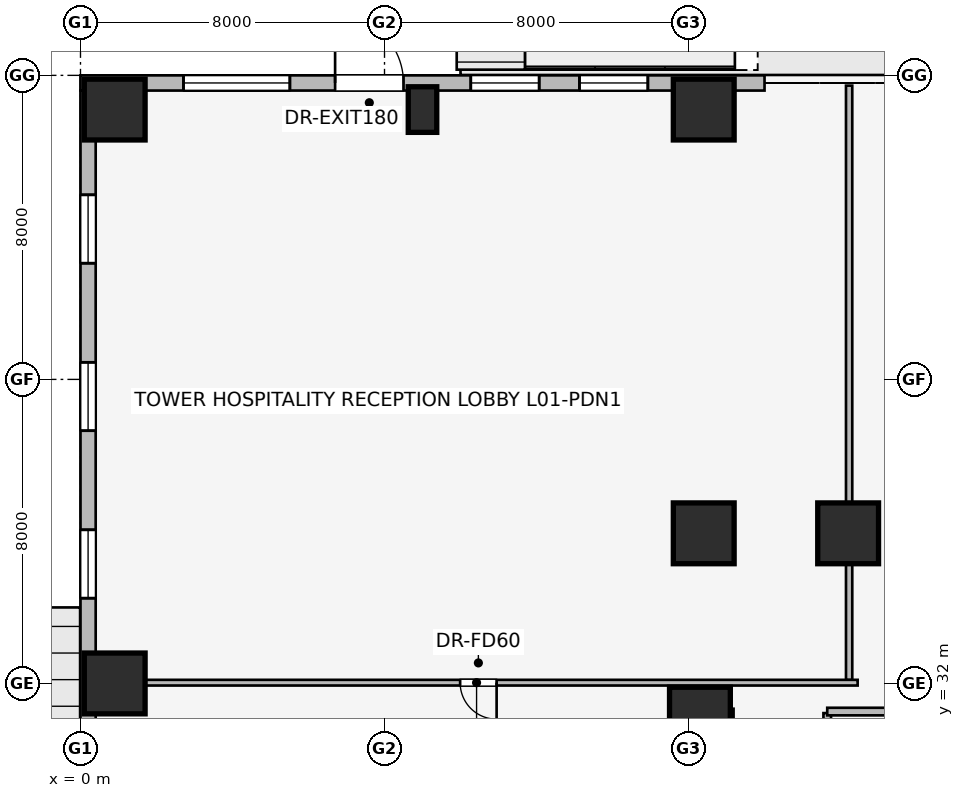
"""IFC4 building model, lengths in metres.
Left out: names, types, materials, properties, quantities, classifications, styles, units other than length and angle.
Written with IfcOpenShell. Run it as: python <this file> out.ifc"""

import sys

from ifc_helpers import new_model, si_unit, direction, frame, frame_2d, origin, origin_2d, place, context, subcontext, project, spatial, rectangle, extrude, element, fill, save


model = new_model("IFC4")
c1 = context("Model", 3, precision=1e-05, world=origin(), true_north=direction((0.0, 1.0)))
c2 = subcontext(c1, "Body", "Model", "MODEL_VIEW")
j1 = project(units=[si_unit("LENGTHUNIT", "METRE"), si_unit("PLANEANGLEUNIT", "RADIAN")], contexts=[c1])
p1 = place(None, origin())
s1 = spatial("IfcSite", under=j1, at=p1, CompositionType="ELEMENT")
p2 = place(p1, origin())
s2 = spatial("IfcBuilding", under=s1, at=p2, CompositionType="ELEMENT")
p3 = place(p2, origin())
s3 = spatial("IfcBuildingStorey", under=s2, at=p3, CompositionType="ELEMENT", Elevation=0.0)
p4 = place(p3, frame((16.85, 25.68, 0.0), z_axis=(0.0, 0.0, 1.0), x_axis=(0.0, 1.0, 0.0)))
e1 = element("IfcWall", 1, at=p4, inside=s3, PredefinedType="SHEAR", context=c2, shape_type="SweptSolid", body=[
    extrude(rectangle(XDim=5.62, YDim=0.6, at=frame_2d((2.81, 0.0))), origin(), (0.0, 0.0, 1.0), 6.0),
])
for number, where, z_axis, x_axis in (
    (2, (16.3, 31.1, 0.0), (0.0, 0.0, 1.0), (1.0, 0.0, 0.0)),
    (3, (0.9, 47.1, 0.0), (0.0, 0.0, 1.0), (1.0, 0.0, 0.0)),
    (4, (16.4, 47.1, 0.0), (0.0, 0.0, 1.0), (1.0, 0.0, 0.0)),
    (5, (0.9, 32.0, 0.0), (0.0, 0.0, 1.0), (1.0, 0.0, 0.0)),
    (6, (20.2, 35.95, 0.0), (0.0, 0.0, 1.0), (1.0, 0.0, 0.0)),
    (7, (16.4, 35.95, 0.0), (0.0, 0.0, 1.0), (1.0, 0.0, 0.0)),
):
    element("IfcColumn", number, at=place(p3, frame(where, z_axis=z_axis, x_axis=x_axis)), inside=s3, PredefinedType="COLUMN", context=c2, shape_type="SweptSolid", body=[
        extrude(rectangle(XDim=1.6, YDim=1.6, at=origin_2d()), origin(), (0.0, 0.0, 1.0), 6.0),
    ])
p5 = place(p3, frame((9.0, 47.1, 0.0), z_axis=(0.0, 0.0, 1.0), x_axis=(1.0, 0.0, 0.0)))
e8 = element("IfcColumn", 8, at=p5, inside=s3, PredefinedType="PILASTER", context=c2, shape_type="SweptSolid", body=[
    extrude(rectangle(XDim=0.75, YDim=1.2, at=origin_2d()), origin(), (0.0, 0.0, 1.0), 6.0),
])
p6 = place(p3, frame((0.0, 47.8, 0.0), z_axis=(0.0, 0.0, 1.0), x_axis=(1.0, 0.0, 0.0)))
e9 = element("IfcWall", 9, at=p6, inside=s3, PredefinedType="STANDARD", context=c2, shape_type="SweptSolid", body=[
    extrude(rectangle(XDim=18.0, YDim=0.4, at=frame_2d((9.0, 0.0))), origin(), (0.0, 0.0, 1.0), 5.69),
])
p7 = place(p6, frame((6.7, 0.0, 0.0)))
e10 = element("IfcOpeningElement", 10, at=p7, cuts=e9, PredefinedType="OPENING", context=c2, shape_type="SweptSolid", body=[
    extrude(rectangle(XDim=1.8, YDim=2.3, at=frame_2d((0.9, 1.15))), frame((0.0, 0.21, 0.0), z_axis=(0.0, -1.0, 0.0), x_axis=(1.0, 0.0, 0.0)), (0.0, 0.0, 1.0), 0.42),
])
p8 = place(p6, frame((2.71, 0.0, 0.75)))
e11 = element("IfcOpeningElement", 11, at=p8, cuts=e9, PredefinedType="OPENING", context=c2, shape_type="SweptSolid", body=[
    extrude(rectangle(XDim=2.8, YDim=1.8, at=frame_2d((1.4, 0.9))), frame((0.0, 0.21, 0.0), z_axis=(0.0, -1.0, 0.0), x_axis=(1.0, 0.0, 0.0)), (0.0, 0.0, 1.0), 0.42),
])
p9 = place(p6, frame((10.27, 0.0, 0.75)))
e12 = element("IfcOpeningElement", 12, at=p9, cuts=e9, PredefinedType="OPENING", context=c2, shape_type="SweptSolid", body=[
    extrude(rectangle(XDim=1.8, YDim=1.5, at=frame_2d((0.9, 0.75))), frame((0.0, 0.21, 0.0), z_axis=(0.0, -1.0, 0.0), x_axis=(1.0, 0.0, 0.0)), (0.0, 0.0, 1.0), 0.42),
])
p10 = place(p6, frame((13.13, 0.0, 0.75)))
e13 = element("IfcOpeningElement", 13, at=p10, cuts=e9, PredefinedType="OPENING", context=c2, shape_type="SweptSolid", body=[
    extrude(rectangle(XDim=1.8, YDim=1.5, at=frame_2d((0.9, 0.75))), frame((0.0, 0.21, 0.0), z_axis=(0.0, -1.0, 0.0), x_axis=(1.0, 0.0, 0.0)), (0.0, 0.0, 1.0), 0.42),
])
p11 = place(p3, frame((0.2, 24.0, 0.0), z_axis=(0.0, 0.0, 1.0), x_axis=(0.0, 1.0, 0.0)))
e14 = element("IfcWall", 14, at=p11, inside=s3, PredefinedType="STANDARD", context=c2, shape_type="SweptSolid", body=[
    extrude(rectangle(XDim=23.6, YDim=0.4, at=frame_2d((11.8, 0.0))), origin(), (0.0, 0.0, 1.0), 5.69),
])
p12 = place(p11, frame((0.778, 0.0, 0.75)))
e15 = element("IfcOpeningElement", 15, at=p12, cuts=e14, PredefinedType="OPENING", context=c2, shape_type="SweptSolid", body=[
    extrude(rectangle(XDim=2.8, YDim=1.8, at=frame_2d((1.4, 0.9))), frame((0.0, 0.21, 0.0), z_axis=(0.0, -1.0, 0.0), x_axis=(1.0, 0.0, 0.0)), (0.0, 0.0, 1.0), 0.42),
])
p13 = place(p11, frame((4.033, 0.0, 0.75)))
e16 = element("IfcOpeningElement", 16, at=p13, cuts=e14, PredefinedType="OPENING", context=c2, shape_type="SweptSolid", body=[
    extrude(rectangle(XDim=2.8, YDim=1.8, at=frame_2d((1.4, 0.9))), frame((0.0, 0.21, 0.0), z_axis=(0.0, -1.0, 0.0), x_axis=(1.0, 0.0, 0.0)), (0.0, 0.0, 1.0), 0.42),
])
p14 = place(p11, frame((10.243, 0.0, 0.75)))
e17 = element("IfcOpeningElement", 17, at=p14, cuts=e14, PredefinedType="OPENING", context=c2, shape_type="SweptSolid", body=[
    extrude(rectangle(XDim=1.8, YDim=1.5, at=frame_2d((0.9, 0.75))), frame((0.0, 0.21, 0.0), z_axis=(0.0, -1.0, 0.0), x_axis=(1.0, 0.0, 0.0)), (0.0, 0.0, 1.0), 0.42),
])
p15 = place(p11, frame((14.65, 0.0, 0.75)))
e18 = element("IfcOpeningElement", 18, at=p15, cuts=e14, PredefinedType="OPENING", context=c2, shape_type="SweptSolid", body=[
    extrude(rectangle(XDim=1.8, YDim=1.5, at=frame_2d((0.9, 0.75))), frame((0.0, 0.21, 0.0), z_axis=(0.0, -1.0, 0.0), x_axis=(1.0, 0.0, 0.0)), (0.0, 0.0, 1.0), 0.42),
])
p16 = place(p11, frame((19.057, 0.0, 0.75)))
e19 = element("IfcOpeningElement", 19, at=p16, cuts=e14, PredefinedType="OPENING", context=c2, shape_type="SweptSolid", body=[
    extrude(rectangle(XDim=1.8, YDim=1.5, at=frame_2d((0.9, 0.75))), frame((0.0, 0.21, 0.0), z_axis=(0.0, -1.0, 0.0), x_axis=(1.0, 0.0, 0.0)), (0.0, 0.0, 1.0), 0.42),
])
p17 = place(p3, frame((19.65, 25.68, 0.0), z_axis=(0.0, 0.0, 1.0), x_axis=(0.0, 1.0, 0.0)))
e20 = element("IfcWall", 20, at=p17, inside=s3, PredefinedType="PARTITIONING", context=c2, shape_type="SweptSolid", body=[
    extrude(rectangle(XDim=5.54, YDim=0.2, at=frame_2d((2.77, 0.0))), origin(), (0.0, 0.0, 1.0), 5.69),
])
p18 = place(p17, frame((0.62, 0.0, 0.0)))
e21 = element("IfcOpeningElement", 21, at=p18, cuts=e20, PredefinedType="OPENING", context=c2, shape_type="SweptSolid", body=[
    extrude(rectangle(XDim=1.1, YDim=2.2, at=frame_2d((0.55, 1.1))), frame((0.0, 0.11, 0.0), z_axis=(0.0, -1.0, 0.0), x_axis=(1.0, 0.0, 0.0)), (0.0, 0.0, 1.0), 0.22),
])
p19 = place(p17, frame((3.12, 0.0, 0.0)))
e22 = element("IfcOpeningElement", 22, at=p19, cuts=e20, PredefinedType="OPENING", context=c2, shape_type="SweptSolid", body=[
    extrude(rectangle(XDim=1.1, YDim=2.2, at=frame_2d((0.55, 1.1))), frame((0.0, 0.11, 0.0), z_axis=(0.0, -1.0, 0.0), x_axis=(1.0, 0.0, 0.0)), (0.0, 0.0, 1.0), 0.22),
])
p20 = place(p3, frame((21.33, 31.26, 0.0), z_axis=(0.0, 0.0, 1.0), x_axis=(-1.0, 0.0, 0.0)))
e23 = element("IfcWall", 23, at=p20, inside=s3, PredefinedType="PARTITIONING", context=c2, shape_type="SweptSolid", body=[
    extrude(rectangle(XDim=1.68, YDim=0.2, at=frame_2d((0.84, 0.0))), origin(), (0.0, 0.0, 1.0), 5.69),
])
p21 = place(p3, frame((20.226, 32.09, 0.0), z_axis=(0.0, 0.0, 1.0), x_axis=(0.0, 1.0, 0.0)))
e24 = element("IfcWall", 24, at=p21, inside=s3, PredefinedType="PARTITIONING", context=c2, shape_type="SweptSolid", body=[
    extrude(rectangle(XDim=15.64, YDim=0.165, at=frame_2d((7.82, 0.0))), origin(), (0.0, 0.0, 1.0), 5.69),
])
p22 = place(p3, frame((20.45, 32.02, 0.0), z_axis=(0.0, 0.0, 1.0), x_axis=(-1.0, 0.0, 0.0)))
e25 = element("IfcWall", 25, at=p22, inside=s3, PredefinedType="PARTITIONING", context=c2, shape_type="SweptSolid", body=[
    extrude(rectangle(XDim=20.055, YDim=0.15, at=frame_2d((10.027, 0.0))), origin(), (0.0, 0.0, 1.0), 4.742),
])
p23 = place(p22, frame((9.5, 0.0, 0.0)))
e26 = element("IfcOpeningElement", 26, at=p23, cuts=e25, PredefinedType="OPENING", context=c2, shape_type="SweptSolid", body=[
    extrude(rectangle(XDim=0.96, YDim=2.0, at=frame_2d((0.48, 1.0))), frame((0.0, 0.085, 0.0), z_axis=(0.0, -1.0, 0.0), x_axis=(1.0, 0.0, 0.0)), (0.0, 0.0, 1.0), 0.17),
])
p24 = place(p7, origin())
e27 = element("IfcDoor", 27, at=p24, inside=s3, OperationType="SINGLE_SWING_LEFT", PredefinedType="DOOR", context=c2, shape_type="SweptSolid", body=[
    extrude(rectangle(XDim=1.8, YDim=2.3, at=frame_2d((0.9, 1.15))), frame((0.0, 0.025, 0.0), z_axis=(0.0, -1.0, 0.0), x_axis=(1.0, 0.0, 0.0)), (0.0, 0.0, 1.0), 0.05),
])
fill(e10, e27)
p25 = place(p8, origin())
e28 = element("IfcWindow", 28, at=p25, inside=s3, PartitioningType="SINGLE_PANEL", PredefinedType="WINDOW", context=c2, shape_type="SweptSolid", body=[
    extrude(rectangle(XDim=2.8, YDim=1.8, at=frame_2d((1.4, 0.9))), frame((0.0, 0.03, 0.0), z_axis=(0.0, -1.0, 0.0), x_axis=(1.0, 0.0, 0.0)), (0.0, 0.0, 1.0), 0.06),
])
fill(e11, e28)
p26 = place(p9, origin())
e29 = element("IfcWindow", 29, at=p26, inside=s3, PartitioningType="SINGLE_PANEL", PredefinedType="WINDOW", context=c2, shape_type="SweptSolid", body=[
    extrude(rectangle(XDim=1.8, YDim=1.5, at=frame_2d((0.9, 0.75))), frame((0.0, 0.03, 0.0), z_axis=(0.0, -1.0, 0.0), x_axis=(1.0, 0.0, 0.0)), (0.0, 0.0, 1.0), 0.06),
])
fill(e12, e29)
p27 = place(p10, origin())
e30 = element("IfcWindow", 30, at=p27, inside=s3, PartitioningType="SINGLE_PANEL", PredefinedType="WINDOW", context=c2, shape_type="SweptSolid", body=[
    extrude(rectangle(XDim=1.8, YDim=1.5, at=frame_2d((0.9, 0.75))), frame((0.0, 0.03, 0.0), z_axis=(0.0, -1.0, 0.0), x_axis=(1.0, 0.0, 0.0)), (0.0, 0.0, 1.0), 0.06),
])
fill(e13, e30)
p28 = place(p14, origin())
e31 = element("IfcWindow", 31, at=p28, inside=s3, PartitioningType="SINGLE_PANEL", PredefinedType="WINDOW", context=c2, shape_type="SweptSolid", body=[
    extrude(rectangle(XDim=1.8, YDim=1.5, at=frame_2d((0.9, 0.75))), frame((0.0, 0.03, 0.0), z_axis=(0.0, -1.0, 0.0), x_axis=(1.0, 0.0, 0.0)), (0.0, 0.0, 1.0), 0.06),
])
fill(e17, e31)
p29 = place(p15, origin())
e32 = element("IfcWindow", 32, at=p29, inside=s3, PartitioningType="SINGLE_PANEL", PredefinedType="WINDOW", context=c2, shape_type="SweptSolid", body=[
    extrude(rectangle(XDim=1.8, YDim=1.5, at=frame_2d((0.9, 0.75))), frame((0.0, 0.03, 0.0), z_axis=(0.0, -1.0, 0.0), x_axis=(1.0, 0.0, 0.0)), (0.0, 0.0, 1.0), 0.06),
])
fill(e18, e32)
p30 = place(p16, origin())
e33 = element("IfcWindow", 33, at=p30, inside=s3, PartitioningType="SINGLE_PANEL", PredefinedType="WINDOW", context=c2, shape_type="SweptSolid", body=[
    extrude(rectangle(XDim=1.8, YDim=1.5, at=frame_2d((0.9, 0.75))), frame((0.0, 0.03, 0.0), z_axis=(0.0, -1.0, 0.0), x_axis=(1.0, 0.0, 0.0)), (0.0, 0.0, 1.0), 0.06),
])
fill(e19, e33)
p31 = place(p23, origin())
e34 = element("IfcDoor", 34, at=p31, inside=s3, OperationType="SINGLE_SWING_LEFT", PredefinedType="DOOR", context=c2, shape_type="SweptSolid", body=[
    extrude(rectangle(XDim=0.96, YDim=2.0, at=frame_2d((0.48, 1.0))), frame((0.0, 0.025, 0.0), z_axis=(0.0, -1.0, 0.0), x_axis=(1.0, 0.0, 0.0)), (0.0, 0.0, 1.0), 0.05),
])
fill(e26, e34)
save(model, sys.argv[1])
